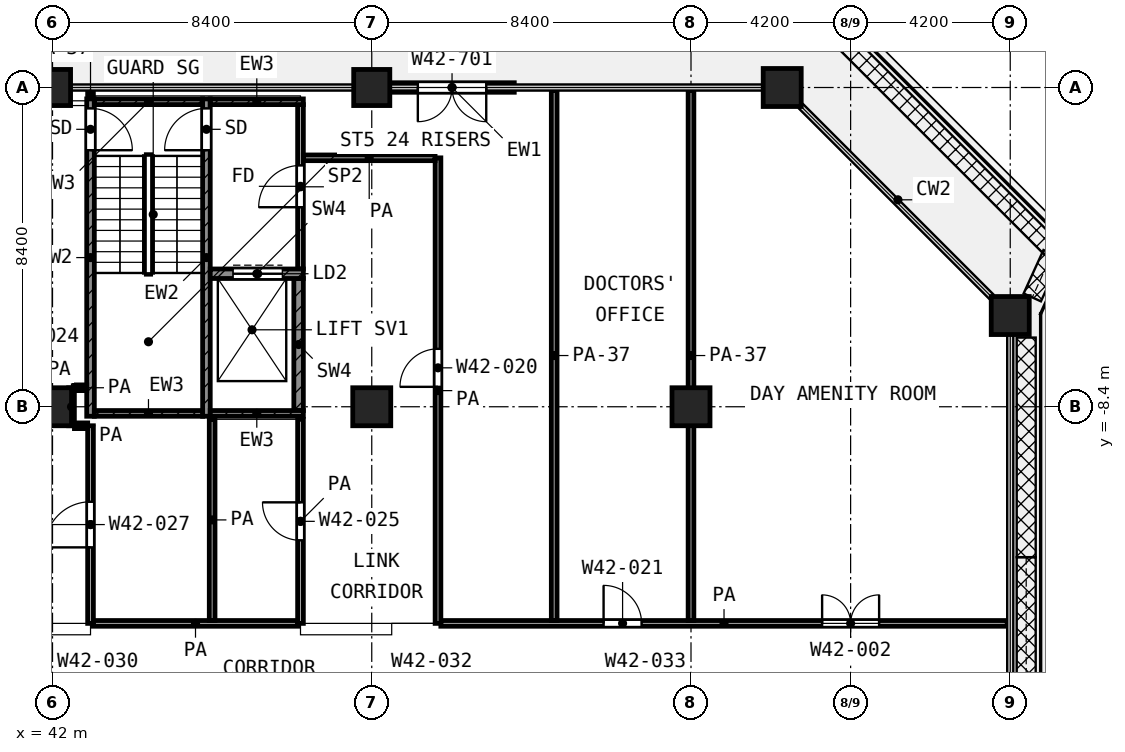
"""IFC4 building model, lengths in metres.
Left out: names, types, materials, properties, quantities, classifications, styles, units other than length and angle.
Written with IfcOpenShell. Run it as: python <this file> out.ifc"""

import sys

from ifc_helpers import new_model, si_unit, direction, frame, frame_2d, origin, origin_2d, place, context, subcontext, project, spatial, rectangle, extrude, element, fill, save


model = new_model("IFC4")
c1 = context("Model", 3, precision=1e-05, world=origin(), true_north=direction((0.0, 1.0)))
c2 = subcontext(c1, "Body", "Model", "MODEL_VIEW")
j1 = project(units=[si_unit("LENGTHUNIT", "METRE"), si_unit("PLANEANGLEUNIT", "RADIAN")], contexts=[c1])
p1 = place(None, origin())
s1 = spatial("IfcSite", under=j1, at=p1, CompositionType="ELEMENT")
p2 = place(p1, origin())
s2 = spatial("IfcBuilding", under=s1, at=p2, CompositionType="ELEMENT")
p3 = place(p2, frame((0.0, 0.0, 204.6)))
s3 = spatial("IfcBuildingStorey", under=s2, at=p3, CompositionType="ELEMENT", Elevation=204.6)
for number, where, z_axis, x_axis in (
    (1, (42.0, 0.0, 0.0), (0.0, 0.0, 1.0), (1.0, 0.0, 0.0)),
    (2, (50.4, 0.0, 0.0), (0.0, 0.0, 1.0), (1.0, 0.0, 0.0)),
):
    element("IfcColumn", number, at=place(p3, frame(where, z_axis=z_axis, x_axis=x_axis)), inside=s3, PredefinedType="COLUMN", context=c2, shape_type="SweptSolid", body=[
        extrude(rectangle(XDim=0.95, YDim=0.95, at=origin_2d()), origin(), (0.0, 0.0, 1.0), 4.2),
    ])
for number, where, z_axis, x_axis in (
    (3, (61.2, 0.0, 0.0), (0.0, 0.0, 1.0), (1.0, 0.0, 0.0)),
    (4, (67.2, -6.0, 0.0), (0.0, 0.0, 1.0), (1.0, 0.0, 0.0)),
    (5, (42.0, -8.4, 0.0), (0.0, 0.0, 1.0), (1.0, 0.0, 0.0)),
    (6, (50.4, -8.4, 0.0), (0.0, 0.0, 1.0), (1.0, 0.0, 0.0)),
    (7, (58.8, -8.4, 0.0), (0.0, 0.0, 1.0), (1.0, 0.0, 0.0)),
):
    element("IfcColumn", number, at=place(p3, frame(where, z_axis=z_axis, x_axis=x_axis)), inside=s3, PredefinedType="COLUMN", context=c2, shape_type="SweptSolid", body=[
        extrude(rectangle(XDim=1.0, YDim=1.0, at=origin_2d()), origin(), (0.0, 0.0, 1.0), 4.2),
    ])
p4 = place(p3, frame((54.15, 0.0, 0.0), z_axis=(0.0, 0.0, 1.0), x_axis=(-1.0, 0.0, 0.0)))
e8 = element("IfcWall", 8, at=p4, inside=s3, PredefinedType="SOLIDWALL", context=c2, shape_type="SweptSolid", body=[
    extrude(rectangle(XDim=3.275, YDim=0.25, at=frame_2d((1.637, 0.0))), origin(), (0.0, 0.0, 1.0), 2.58),
])
p5 = place(p4, frame((0.738, 0.0, 0.0)))
e9 = element("IfcOpeningElement", 9, at=p5, cuts=e8, PredefinedType="OPENING", context=c2, shape_type="SweptSolid", body=[
    extrude(rectangle(XDim=1.8, YDim=2.1, at=frame_2d((0.9, 1.05))), frame((0.0, 0.135, 0.0), z_axis=(0.0, -1.0, 0.0), x_axis=(1.0, 0.0, 0.0)), (0.0, 0.0, 1.0), 0.27),
])
p6 = place(p3, frame((43.0, -8.65, 0.0), z_axis=(0.0, 0.0, 1.0), x_axis=(0.0, 1.0, 0.0)))
e10 = element("IfcWall", 10, at=p6, inside=s3, PredefinedType="SHEAR", context=c2, shape_type="SweptSolid", body=[
    extrude(rectangle(XDim=8.35, YDim=0.2, at=frame_2d((4.175, 0.0))), origin(), (0.0, 0.0, 1.0), 3.6),
])
p7 = place(p6, frame((7.0, 0.0, 0.0)))
e11 = element("IfcOpeningElement", 11, at=p7, cuts=e10, PredefinedType="OPENING", context=c2, shape_type="SweptSolid", body=[
    extrude(rectangle(XDim=1.1, YDim=2.1, at=frame_2d((0.55, 1.05))), frame((0.0, 0.11, 0.0), z_axis=(0.0, -1.0, 0.0), x_axis=(1.0, 0.0, 0.0)), (0.0, 0.0, 1.0), 0.22),
])
p8 = place(p3, frame((46.05, -8.65, 0.0), z_axis=(0.0, 0.0, 1.0), x_axis=(0.0, 1.0, 0.0)))
e12 = element("IfcWall", 12, at=p8, inside=s3, PredefinedType="SHEAR", context=c2, shape_type="SweptSolid", body=[
    extrude(rectangle(XDim=8.35, YDim=0.2, at=frame_2d((4.175, 0.0))), origin(), (0.0, 0.0, 1.0), 3.6),
])
p9 = place(p8, frame((7.0, 0.0, 0.0)))
e13 = element("IfcOpeningElement", 13, at=p9, cuts=e12, PredefinedType="OPENING", context=c2, shape_type="SweptSolid", body=[
    extrude(rectangle(XDim=1.1, YDim=2.1, at=frame_2d((0.55, 1.05))), frame((0.0, 0.11, 0.0), z_axis=(0.0, -1.0, 0.0), x_axis=(1.0, 0.0, 0.0)), (0.0, 0.0, 1.0), 0.22),
])
p10 = place(p3, frame((43.1, -0.375, 0.0), z_axis=(0.0, 0.0, 1.0), x_axis=(1.0, 0.0, 0.0)))
e14 = element("IfcWall", 14, at=p10, inside=s3, PredefinedType="SHEAR", context=c2, shape_type="SweptSolid", body=[
    extrude(rectangle(XDim=2.85, YDim=0.15, at=frame_2d((1.425, 0.0))), origin(), (0.0, 0.0, 1.0), 3.6),
])
p11 = place(p3, frame((46.15, -0.375, 0.0), z_axis=(0.0, 0.0, 1.0), x_axis=(1.0, 0.0, 0.0)))
e15 = element("IfcWall", 15, at=p11, inside=s3, PredefinedType="SHEAR", context=c2, shape_type="SweptSolid", body=[
    extrude(rectangle(XDim=2.45, YDim=0.15, at=frame_2d((1.225, 0.0))), origin(), (0.0, 0.0, 1.0), 3.6),
])
p12 = place(p3, frame((43.1, -8.575, 0.0), z_axis=(0.0, 0.0, 1.0), x_axis=(1.0, 0.0, 0.0)))
e16 = element("IfcWall", 16, at=p12, inside=s3, PredefinedType="SHEAR", context=c2, shape_type="SweptSolid", body=[
    extrude(rectangle(XDim=2.85, YDim=0.15, at=frame_2d((1.425, 0.0))), origin(), (0.0, 0.0, 1.0), 3.6),
])
p13 = place(p3, frame((46.15, -8.575, 0.0), z_axis=(0.0, 0.0, 1.0), x_axis=(1.0, 0.0, 0.0)))
e17 = element("IfcWall", 17, at=p13, inside=s3, PredefinedType="SHEAR", context=c2, shape_type="SweptSolid", body=[
    extrude(rectangle(XDim=2.45, YDim=0.15, at=frame_2d((1.225, 0.0))), origin(), (0.0, 0.0, 1.0), 3.6),
])
p14 = place(p3, frame((46.15, -4.9, 0.0), z_axis=(0.0, 0.0, 1.0), x_axis=(1.0, 0.0, 0.0)))
e18 = element("IfcWall", 18, at=p14, inside=s3, PredefinedType="SHEAR", context=c2, shape_type="SweptSolid", body=[
    extrude(rectangle(XDim=2.45, YDim=0.25, at=frame_2d((1.225, 0.0))), origin(), (0.0, 0.0, 1.0), 3.6),
])
p15 = place(p14, frame((0.6, 0.0, 0.0)))
e19 = element("IfcOpeningElement", 19, at=p15, cuts=e18, PredefinedType="OPENING", context=c2, shape_type="SweptSolid", body=[
    extrude(rectangle(XDim=1.3, YDim=2.1, at=frame_2d((0.65, 1.05))), frame((0.0, 0.135, 0.0), z_axis=(0.0, -1.0, 0.0), x_axis=(1.0, 0.0, 0.0)), (0.0, 0.0, 1.0), 0.27),
])
p16 = place(p3, frame((48.475, -8.5, 0.0), z_axis=(0.0, 0.0, 1.0), x_axis=(0.0, 1.0, 0.0)))
e20 = element("IfcWall", 20, at=p16, inside=s3, PredefinedType="SHEAR", context=c2, shape_type="SweptSolid", body=[
    extrude(rectangle(XDim=3.475, YDim=0.25, at=frame_2d((1.738, 0.0))), origin(), (0.0, 0.0, 1.0), 3.6),
])
p17 = place(p3, frame((48.525, -4.775, 0.0), z_axis=(0.0, 0.0, 1.0), x_axis=(0.0, 1.0, 0.0)))
e21 = element("IfcWall", 21, at=p17, inside=s3, PredefinedType="PARTITIONING", context=c2, shape_type="SweptSolid", body=[
    extrude(rectangle(XDim=4.325, YDim=0.15, at=frame_2d((2.163, 0.0))), origin(), (0.0, 0.0, 1.0), 3.6),
])
p18 = place(p17, frame((1.625, 0.0, 0.0)))
e22 = element("IfcOpeningElement", 22, at=p18, cuts=e21, PredefinedType="OPENING", context=c2, shape_type="SweptSolid", body=[
    extrude(rectangle(XDim=1.1, YDim=2.1, at=frame_2d((0.55, 1.05))), frame((0.0, 0.085, 0.0), z_axis=(0.0, -1.0, 0.0), x_axis=(1.0, 0.0, 0.0)), (0.0, 0.0, 1.0), 0.17),
])
p19 = place(p3, frame((43.075, -14.1, 0.0), z_axis=(0.0, 0.0, 1.0), x_axis=(1.0, 0.0, 0.0)))
e23 = element("IfcWall", 23, at=p19, inside=s3, PredefinedType="PARTITIONING", context=c2, shape_type="SweptSolid", body=[
    extrude(rectangle(XDim=5.375, YDim=0.15, at=frame_2d((2.688, 0.0))), origin(), (0.0, 0.0, 1.0), 3.6),
])
p20 = place(p3, frame((52.218, -14.1, 0.0), z_axis=(0.0, 0.0, 1.0), x_axis=(1.0, 0.0, 0.0)))
e24 = element("IfcWall", 24, at=p20, inside=s3, PredefinedType="PARTITIONING", context=c2, shape_type="SweptSolid", body=[
    extrude(rectangle(XDim=14.902, YDim=0.15, at=frame_2d((7.451, 0.0))), origin(), (0.0, 0.0, 1.0), 3.6),
])
p21 = place(p20, frame((4.282, 0.0, 0.0)))
e25 = element("IfcOpeningElement", 25, at=p21, cuts=e24, PredefinedType="OPENING", context=c2, shape_type="SweptSolid", body=[
    extrude(rectangle(XDim=1.0, YDim=2.1, at=frame_2d((0.5, 1.05))), frame((0.0, 0.085, 0.0), z_axis=(0.0, -1.0, 0.0), x_axis=(1.0, 0.0, 0.0)), (0.0, 0.0, 1.0), 0.17),
])
p22 = place(p20, frame((10.032, 0.0, 0.0)))
e26 = element("IfcOpeningElement", 26, at=p22, cuts=e24, PredefinedType="OPENING", context=c2, shape_type="SweptSolid", body=[
    extrude(rectangle(XDim=1.5, YDim=2.1, at=frame_2d((0.75, 1.05))), frame((0.0, 0.085, 0.0), z_axis=(0.0, -1.0, 0.0), x_axis=(1.0, 0.0, 0.0)), (0.0, 0.0, 1.0), 0.17),
])
p23 = place(p3, frame((42.577, -8.9, 0.0), z_axis=(0.0, 0.0, 1.0), x_axis=(1.0, 0.0, 0.0)))
e27 = element("IfcWall", 27, at=p23, inside=s3, PredefinedType="PARTITIONING", context=c2, shape_type="SweptSolid", body=[
    extrude(rectangle(XDim=0.348, YDim=0.15, at=frame_2d((0.174, 0.0))), origin(), (0.0, 0.0, 1.0), 3.6),
])
p24 = place(p3, frame((42.577, -7.9, 0.0), z_axis=(0.0, 0.0, 1.0), x_axis=(1.0, 0.0, 0.0)))
e28 = element("IfcWall", 28, at=p24, inside=s3, PredefinedType="PARTITIONING", context=c2, shape_type="SweptSolid", body=[
    extrude(rectangle(XDim=0.323, YDim=0.15, at=frame_2d((0.162, 0.0))), origin(), (0.0, 0.0, 1.0), 3.6),
])
p25 = place(p3, frame((48.6, -1.85, 0.0), z_axis=(0.0, 0.0, 1.0), x_axis=(1.0, 0.0, 0.0)))
e29 = element("IfcWall", 29, at=p25, inside=s3, PredefinedType="PARTITIONING", context=c2, shape_type="SweptSolid", body=[
    extrude(rectangle(XDim=3.466, YDim=0.15, at=frame_2d((1.733, 0.0))), origin(), (0.0, 0.0, 1.0), 3.6),
])
p26 = place(p3, frame((42.5, -8.899, 0.0), z_axis=(0.0, 0.0, 1.0), x_axis=(0.0, 1.0, 0.0)))
e30 = element("IfcWall", 30, at=p26, inside=s3, PredefinedType="PARTITIONING", context=c2, shape_type="SweptSolid", body=[
    extrude(rectangle(XDim=0.997, YDim=0.15, at=frame_2d((0.499, 0.0))), origin(), (0.0, 0.0, 1.0), 3.6),
])
p27 = place(p3, frame((43.0, -14.1, 0.0), z_axis=(0.0, 0.0, 1.0), x_axis=(0.0, 1.0, 0.0)))
e31 = element("IfcWall", 31, at=p27, inside=s3, PredefinedType="PARTITIONING", context=c2, shape_type="SweptSolid", body=[
    extrude(rectangle(XDim=5.2, YDim=0.15, at=frame_2d((2.6, 0.0))), origin(), (0.0, 0.0, 1.0), 3.6),
])
p28 = place(p27, frame((2.0, 0.0, 0.0)))
e32 = element("IfcOpeningElement", 32, at=p28, cuts=e31, PredefinedType="OPENING", context=c2, shape_type="SweptSolid", body=[
    extrude(rectangle(XDim=1.2, YDim=2.1, at=frame_2d((0.6, 1.05))), frame((0.0, 0.085, 0.0), z_axis=(0.0, -1.0, 0.0), x_axis=(1.0, 0.0, 0.0)), (0.0, 0.0, 1.0), 0.17),
])
p29 = place(p3, frame((43.0, -0.27, 0.0), z_axis=(0.0, 0.0, 1.0), x_axis=(0.0, 1.0, 0.0)))
e33 = element("IfcWall", 33, at=p29, inside=s3, PredefinedType="PARTITIONING", context=c2, shape_type="SweptSolid", body=[
    extrude(rectangle(XDim=0.19, YDim=0.15, at=frame_2d((0.095, 0.0))), origin(), (0.0, 0.0, 1.0), 2.7),
])
p30 = place(p3, frame((46.2, -14.025, 0.0), z_axis=(0.0, 0.0, 1.0), x_axis=(0.0, 1.0, 0.0)))
e34 = element("IfcWall", 34, at=p30, inside=s3, PredefinedType="PARTITIONING", context=c2, shape_type="SweptSolid", body=[
    extrude(rectangle(XDim=5.295, YDim=0.15, at=frame_2d((2.647, 0.0))), origin(), (0.0, 0.0, 1.0), 3.6),
])
p31 = place(p3, frame((48.525, -14.1, 0.0), z_axis=(0.0, 0.0, 1.0), x_axis=(0.0, 1.0, 0.0)))
e35 = element("IfcWall", 35, at=p31, inside=s3, PredefinedType="PARTITIONING", context=c2, shape_type="SweptSolid", body=[
    extrude(rectangle(XDim=5.37, YDim=0.15, at=frame_2d((2.685, 0.0))), origin(), (0.0, 0.0, 1.0), 3.6),
])
p32 = place(p31, frame((2.185, 0.0, 0.0)))
e36 = element("IfcOpeningElement", 36, at=p32, cuts=e35, PredefinedType="OPENING", context=c2, shape_type="SweptSolid", body=[
    extrude(rectangle(XDim=1.0, YDim=2.1, at=frame_2d((0.5, 1.05))), frame((0.0, 0.085, 0.0), z_axis=(0.0, -1.0, 0.0), x_axis=(1.0, 0.0, 0.0)), (0.0, 0.0, 1.0), 0.17),
])
p33 = place(p3, frame((52.143, -14.1, 0.0), z_axis=(0.0, 0.0, 1.0), x_axis=(0.0, 1.0, 0.0)))
e37 = element("IfcWall", 37, at=p33, inside=s3, PredefinedType="PARTITIONING", context=c2, shape_type="SweptSolid", body=[
    extrude(rectangle(XDim=12.249, YDim=0.15, at=frame_2d((6.125, 0.0))), origin(), (0.0, 0.0, 1.0), 3.6),
])
p34 = place(p33, frame((6.224, 0.0, 0.0)))
e38 = element("IfcOpeningElement", 38, at=p34, cuts=e37, PredefinedType="OPENING", context=c2, shape_type="SweptSolid", body=[
    extrude(rectangle(XDim=1.0, YDim=2.1, at=frame_2d((0.5, 1.05))), frame((0.0, 0.085, 0.0), z_axis=(0.0, -1.0, 0.0), x_axis=(1.0, 0.0, 0.0)), (0.0, 0.0, 1.0), 0.17),
])
for number, where, z_axis, x_axis in (
    (39, (55.2, -14.025, 0.0), (0.0, 0.0, 1.0), (0.0, 1.0, 0.0)),
    (40, (58.8, -14.025, 0.0), (0.0, 0.0, 1.0), (0.0, 1.0, 0.0)),
):
    element("IfcWall", number, at=place(p3, frame(where, z_axis=z_axis, x_axis=x_axis)), inside=s3, PredefinedType="PARTITIONING", context=c2, shape_type="SweptSolid", body=[
        extrude(rectangle(XDim=13.945, YDim=0.15, at=frame_2d((6.972, 0.0))), origin(), (0.0, 0.0, 1.0), 2.7),
    ])
p35 = place(p5, origin())
e41 = element("IfcDoor", 41, at=p35, inside=s3, OperationType="DOUBLE_DOOR_SINGLE_SWING", PredefinedType="DOOR", context=c2, shape_type="SweptSolid", body=[
    extrude(rectangle(XDim=1.8, YDim=2.1, at=frame_2d((0.9, 1.05))), frame((0.0, 0.025, 0.0), z_axis=(0.0, -1.0, 0.0), x_axis=(1.0, 0.0, 0.0)), (0.0, 0.0, 1.0), 0.05),
])
fill(e9, e41)
p36 = place(p7, frame((1.1, 0.0, 0.0), z_axis=(0.0, 0.0, 1.0), x_axis=(-1.0, 0.0, 0.0)))
e42 = element("IfcDoor", 42, at=p36, inside=s3, OperationType="SINGLE_SWING_LEFT", PredefinedType="DOOR", context=c2, shape_type="SweptSolid", body=[
    extrude(rectangle(XDim=1.1, YDim=2.1, at=frame_2d((0.55, 1.05))), frame((0.0, 0.025, 0.0), z_axis=(0.0, -1.0, 0.0), x_axis=(1.0, 0.0, 0.0)), (0.0, 0.0, 1.0), 0.05),
])
fill(e11, e42)
p37 = place(p9, origin())
e43 = element("IfcDoor", 43, at=p37, inside=s3, OperationType="SINGLE_SWING_LEFT", PredefinedType="DOOR", context=c2, shape_type="SweptSolid", body=[
    extrude(rectangle(XDim=1.1, YDim=2.1, at=frame_2d((0.55, 1.05))), frame((0.0, 0.025, 0.0), z_axis=(0.0, -1.0, 0.0), x_axis=(1.0, 0.0, 0.0)), (0.0, 0.0, 1.0), 0.05),
])
fill(e13, e43)
p38 = place(p15, origin())
e44 = element("IfcDoor", 44, at=p38, inside=s3, OperationType="DOUBLE_DOOR_SLIDING", PredefinedType="DOOR", context=c2, shape_type="SweptSolid", body=[
    extrude(rectangle(XDim=1.3, YDim=2.1, at=frame_2d((0.65, 1.05))), frame((0.0, 0.025, 0.0), z_axis=(0.0, -1.0, 0.0), x_axis=(1.0, 0.0, 0.0)), (0.0, 0.0, 1.0), 0.05),
])
fill(e19, e44)
p39 = place(p18, origin())
e45 = element("IfcDoor", 45, at=p39, inside=s3, OperationType="SINGLE_SWING_LEFT", PredefinedType="DOOR", context=c2, shape_type="SweptSolid", body=[
    extrude(rectangle(XDim=1.1, YDim=2.1, at=frame_2d((0.55, 1.05))), frame((0.0, 0.025, 0.0), z_axis=(0.0, -1.0, 0.0), x_axis=(1.0, 0.0, 0.0)), (0.0, 0.0, 1.0), 0.05),
])
fill(e22, e45)
p40 = place(p28, origin())
e46 = element("IfcDoor", 46, at=p40, inside=s3, OperationType="SINGLE_SWING_LEFT", PredefinedType="DOOR", context=c2, shape_type="SweptSolid", body=[
    extrude(rectangle(XDim=1.2, YDim=2.1, at=frame_2d((0.6, 1.05))), frame((0.0, 0.025, 0.0), z_axis=(0.0, -1.0, 0.0), x_axis=(1.0, 0.0, 0.0)), (0.0, 0.0, 1.0), 0.05),
])
fill(e32, e46)
p41 = place(p34, origin())
e47 = element("IfcDoor", 47, at=p41, inside=s3, OperationType="SINGLE_SWING_LEFT", PredefinedType="DOOR", context=c2, shape_type="SweptSolid", body=[
    extrude(rectangle(XDim=1.0, YDim=2.1, at=frame_2d((0.5, 1.05))), frame((0.0, 0.025, 0.0), z_axis=(0.0, -1.0, 0.0), x_axis=(1.0, 0.0, 0.0)), (0.0, 0.0, 1.0), 0.05),
])
fill(e38, e47)
p42 = place(p21, origin())
e48 = element("IfcDoor", 48, at=p42, inside=s3, OperationType="SINGLE_SWING_LEFT", PredefinedType="DOOR", context=c2, shape_type="SweptSolid", body=[
    extrude(rectangle(XDim=1.0, YDim=2.1, at=frame_2d((0.5, 1.05))), frame((0.0, 0.025, 0.0), z_axis=(0.0, -1.0, 0.0), x_axis=(1.0, 0.0, 0.0)), (0.0, 0.0, 1.0), 0.05),
])
fill(e25, e48)
p43 = place(p22, origin())
e49 = element("IfcDoor", 49, at=p43, inside=s3, OperationType="DOUBLE_DOOR_SINGLE_SWING", PredefinedType="DOOR", context=c2, shape_type="SweptSolid", body=[
    extrude(rectangle(XDim=1.5, YDim=2.1, at=frame_2d((0.75, 1.05))), frame((0.0, 0.025, 0.0), z_axis=(0.0, -1.0, 0.0), x_axis=(1.0, 0.0, 0.0)), (0.0, 0.0, 1.0), 0.05),
])
fill(e26, e49)
p44 = place(p32, origin())
e50 = element("IfcDoor", 50, at=p44, inside=s3, OperationType="SINGLE_SWING_RIGHT", PredefinedType="DOOR", context=c2, shape_type="SweptSolid", body=[
    extrude(rectangle(XDim=1.0, YDim=2.1, at=frame_2d((0.5, 1.05))), frame((0.0, 0.025, 0.0), z_axis=(0.0, -1.0, 0.0), x_axis=(1.0, 0.0, 0.0)), (0.0, 0.0, 1.0), 0.05),
])
fill(e36, e50)
save(model, sys.argv[1])
